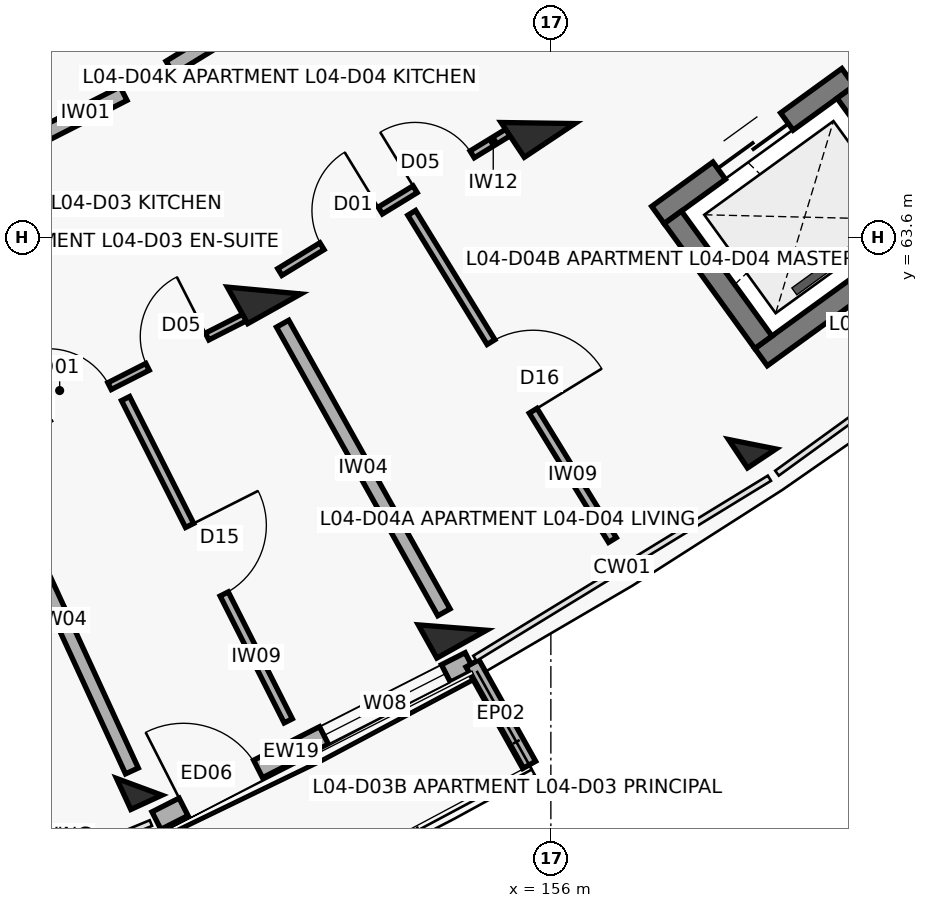
"""IFC4 building model, lengths in metres.
Left out: names, types, materials, properties, quantities, classifications, styles, units other than length and angle.
Written with IfcOpenShell. Run it as: python <this file> out.ifc"""

import sys

from ifc_helpers import new_model, si_unit, direction, frame, frame_2d, origin, origin_2d, place, context, subcontext, project, spatial, rectangle, extrude, element, fill, save


model = new_model("IFC4")
c1 = context("Model", 3, precision=1e-05, world=origin(), true_north=direction((0.0, 1.0)))
c2 = subcontext(c1, "Body", "Model", "MODEL_VIEW")
j1 = project(units=[si_unit("LENGTHUNIT", "METRE"), si_unit("PLANEANGLEUNIT", "RADIAN")], contexts=[c1])
p1 = place(None, origin())
s1 = spatial("IfcSite", under=j1, at=p1, CompositionType="ELEMENT")
p2 = place(p1, origin())
s2 = spatial("IfcBuilding", under=s1, at=p2, CompositionType="ELEMENT")
p3 = place(p2, frame((0.0, 0.0, 14.3)))
s3 = spatial("IfcBuildingStorey", under=s2, at=p3, CompositionType="ELEMENT", Elevation=14.3)
p4 = place(p3, frame((150.584, 56.367, 0.0), z_axis=(0.0, 0.0, 1.0), x_axis=(0.417867073801, -0.908508177527, 0.0)))
e1 = element("IfcColumn", 1, at=p4, inside=s3, PredefinedType="COLUMN", context=c2, shape_type="SweptSolid", body=[
    extrude(rectangle(XDim=0.45, YDim=0.45, at=origin_2d()), origin(), (0.0, 0.0, 1.0), 3.1),
])
p5 = place(p3, frame((152.227, 62.897, 0.0), z_axis=(0.0, 0.0, 1.0), x_axis=(0.487859659139, -0.87292207727, 0.0)))
e2 = element("IfcColumn", 2, at=p5, inside=s3, PredefinedType="COLUMN", context=c2, shape_type="SweptSolid", body=[
    extrude(rectangle(XDim=0.55, YDim=0.8, at=origin_2d()), origin(), (0.0, 0.0, 1.0), 3.1),
])
p6 = place(p3, frame((154.705, 58.462, 0.0), z_axis=(0.0, 0.0, 1.0), x_axis=(0.487859659139, -0.87292207727, 0.0)))
e3 = element("IfcColumn", 3, at=p6, inside=s3, PredefinedType="COLUMN", context=c2, shape_type="SweptSolid", body=[
    extrude(rectangle(XDim=0.5, YDim=0.75, at=origin_2d()), origin(), (0.0, 0.0, 1.0), 3.1),
])
p7 = place(p3, frame((155.831, 65.101, 0.0), z_axis=(0.0, 0.0, 1.0), x_axis=(0.554844427448, -0.83195412213, 0.0)))
e4 = element("IfcColumn", 4, at=p7, inside=s3, PredefinedType="COLUMN", context=c2, shape_type="SweptSolid", body=[
    extrude(rectangle(XDim=0.55, YDim=0.8, at=origin_2d()), origin(), (0.0, 0.0, 1.0), 3.1),
])
p8 = place(p3, frame((158.649, 60.875, 0.0), z_axis=(0.0, 0.0, 1.0), x_axis=(0.554844427448, -0.83195412213, 0.0)))
e5 = element("IfcColumn", 5, at=p8, inside=s3, PredefinedType="COLUMN", context=c2, shape_type="SweptSolid", body=[
    extrude(rectangle(XDim=0.45, YDim=0.45, at=origin_2d()), origin(), (0.0, 0.0, 1.0), 3.1),
])
p9 = place(p3, frame((150.811, 55.922, 0.0), z_axis=(0.0, 0.0, 1.0), x_axis=(0.891407190547, 0.453203288428, 0.0)))
e6 = element("IfcWall", 6, at=p9, inside=s3, PredefinedType="SOLIDWALL", context=c2, shape_type="SweptSolid", body=[
    extrude(rectangle(XDim=4.623, YDim=0.258, at=frame_2d((2.311, 0.0))), origin(), (0.0, 0.0, 1.0), 2.25),
])
p10 = place(p9, frame((0.4, 0.0, 0.0)))
e7 = element("IfcOpeningElement", 7, at=p10, cuts=e6, PredefinedType="OPENING", context=c2, shape_type="SweptSolid", body=[
    extrude(rectangle(XDim=1.1, YDim=2.15, at=frame_2d((0.55, 1.075))), frame((0.0, 0.139, 0.0), z_axis=(0.0, -1.0, 0.0), x_axis=(1.0, 0.0, 0.0)), (0.0, 0.0, 1.0), 0.278),
])
p11 = place(p9, frame((2.472, 0.0, 0.35)))
e8 = element("IfcOpeningElement", 8, at=p11, cuts=e6, PredefinedType="OPENING", context=c2, shape_type="SweptSolid", body=[
    extrude(rectangle(XDim=1.8, YDim=1.65, at=frame_2d((0.9, 0.825))), frame((0.0, 0.139, 0.0), z_axis=(0.0, -1.0, 0.0), x_axis=(1.0, 0.0, 0.0)), (0.0, 0.0, 1.0), 0.278),
])
p12 = place(p3, frame((154.969, 57.991, 0.0), z_axis=(0.0, 0.0, 1.0), x_axis=(0.487971560724, -0.872859528175, 0.0)))
e9 = element("IfcWall", 9, at=p12, inside=s3, PredefinedType="PARAPET", context=c2, shape_type="SweptSolid", body=[
    extrude(rectangle(XDim=1.53, YDim=0.195, at=frame_2d((0.765, 0.0))), origin(), (0.0, 0.0, 1.0), 2.25),
])
p13 = place(p3, frame((157.583, 70.041, 0.0), z_axis=(0.0, 0.0, 1.0), x_axis=(0.648762810187, -0.760990680704, 0.0)))
e10 = element("IfcWall", 10, at=p13, inside=s3, PredefinedType="SHEAR", context=c2, shape_type="SweptSolid", body=[
    extrude(rectangle(XDim=7.69, YDim=0.3, at=frame_2d((3.845, 0.0))), origin(), (0.0, 0.0, 1.0), 3.1),
])
p14 = place(p3, frame((157.409, 63.89, 0.0), z_axis=(0.0, 0.0, 1.0), x_axis=(0.809510936031, 0.587104798521, 0.0)))
e11 = element("IfcWall", 11, at=p14, inside=s3, PredefinedType="SHEAR", context=c2, shape_type="SweptSolid", body=[
    extrude(rectangle(XDim=3.09, YDim=0.28, at=frame_2d((1.545, 0.0))), origin(), (0.0, 0.0, 1.0), 3.1),
])
p15 = place(p14, frame((0.995, 0.0, 0.0)))
e12 = element("IfcOpeningElement", 12, at=p15, cuts=e11, PredefinedType="OPENING", context=c2, shape_type="SweptSolid", body=[
    extrude(rectangle(XDim=1.1, YDim=2.15, at=frame_2d((0.55, 1.075))), frame((0.0, 0.15, 0.0), z_axis=(0.0, -1.0, 0.0), x_axis=(1.0, 0.0, 0.0)), (0.0, 0.0, 1.0), 0.3),
])
p16 = place(p3, frame((158.765, 62.021, 0.0), z_axis=(0.0, 0.0, 1.0), x_axis=(0.809548485838, 0.587053020669, 0.0)))
e13 = element("IfcWall", 13, at=p16, inside=s3, PredefinedType="SHEAR", context=c2, shape_type="SweptSolid", body=[
    extrude(rectangle(XDim=3.09, YDim=0.28, at=frame_2d((1.545, 0.0))), origin(), (0.0, 0.0, 1.0), 3.1),
])
p17 = place(p3, frame((157.604, 63.859, 0.0), z_axis=(0.0, 0.0, 1.0), x_axis=(0.587127188998, -0.809494696671, 0.0)))
e14 = element("IfcWall", 14, at=p17, inside=s3, PredefinedType="SHEAR", context=c2, shape_type="SweptSolid", body=[
    extrude(rectangle(XDim=2.03, YDim=0.28, at=frame_2d((1.015, 0.0))), origin(), (0.0, 0.0, 1.0), 3.1),
])
p18 = place(p3, frame((159.879, 65.509, 0.0), z_axis=(0.0, 0.0, 1.0), x_axis=(0.58704837408, -0.809551855344, 0.0)))
e15 = element("IfcWall", 15, at=p18, inside=s3, PredefinedType="SHEAR", context=c2, shape_type="SweptSolid", body=[
    extrude(rectangle(XDim=2.03, YDim=0.28, at=frame_2d((1.015, 0.0))), origin(), (0.0, 0.0, 1.0), 3.1),
])
p19 = place(p3, frame((147.457, 64.003, 0.0), z_axis=(0.0, 0.0, 1.0), x_axis=(0.891412167565, 0.45319349898, 0.0)))
e16 = element("IfcWall", 16, at=p19, inside=s3, PredefinedType="SOLIDWALL", context=c2, shape_type="SweptSolid", body=[
    extrude(rectangle(XDim=3.277, YDim=0.2, at=frame_2d((1.639, 0.0))), origin(), (0.0, 0.0, 1.0), 2.08),
])
p20 = place(p19, frame((1.128, 0.0, 0.0)))
e17 = element("IfcOpeningElement", 17, at=p20, cuts=e16, PredefinedType="OPENING", context=c2, shape_type="SweptSolid", body=[
    extrude(rectangle(XDim=1.02, YDim=2.15, at=frame_2d((0.51, 1.075))), frame((0.0, 0.11, 0.0), z_axis=(0.0, -1.0, 0.0), x_axis=(1.0, 0.0, 0.0)), (0.0, 0.0, 1.0), 0.22),
])
p21 = place(p3, frame((148.812, 60.937, 0.0), z_axis=(0.0, 0.0, 1.0), x_axis=(0.89140212369, 0.453213254309, 0.0)))
e18 = element("IfcWall", 18, at=p21, inside=s3, PredefinedType="PARTITIONING", context=c2, shape_type="SweptSolid", body=[
    extrude(rectangle(XDim=3.64, YDim=0.1, at=frame_2d((1.82, 0.0))), origin(), (0.0, 0.0, 1.0), 2.08),
])
p22 = place(p21, frame((0.65, 0.0, 0.0)))
e19 = element("IfcOpeningElement", 19, at=p22, cuts=e18, PredefinedType="OPENING", context=c2, shape_type="SweptSolid", body=[
    extrude(rectangle(XDim=0.9, YDim=2.1, at=frame_2d((0.45, 1.05))), frame((0.0, 0.06, 0.0), z_axis=(0.0, -1.0, 0.0), x_axis=(1.0, 0.0, 0.0)), (0.0, 0.0, 1.0), 0.12),
])
p23 = place(p21, frame((2.11, 0.0, 0.0)))
e20 = element("IfcOpeningElement", 20, at=p23, cuts=e18, PredefinedType="OPENING", context=c2, shape_type="SweptSolid", body=[
    extrude(rectangle(XDim=0.88, YDim=2.1, at=frame_2d((0.44, 1.05))), frame((0.0, 0.06, 0.0), z_axis=(0.0, -1.0, 0.0), x_axis=(1.0, 0.0, 0.0)), (0.0, 0.0, 1.0), 0.12),
])
p24 = place(p3, frame((150.404, 61.475, 0.0), z_axis=(0.0, 0.0, 1.0), x_axis=(0.450664257057, -0.892693523787, 0.0)))
e21 = element("IfcWall", 21, at=p24, inside=s3, PredefinedType="PARTITIONING", context=c2, shape_type="SweptSolid", body=[
    extrude(rectangle(XDim=4.75, YDim=0.12, at=frame_2d((2.375, 0.0))), origin(), (0.0, 0.0, 1.0), 2.08),
])
p25 = place(p24, frame((1.87, 0.0, 0.0)))
e22 = element("IfcOpeningElement", 22, at=p25, cuts=e21, PredefinedType="OPENING", context=c2, shape_type="SweptSolid", body=[
    extrude(rectangle(XDim=1.01, YDim=2.1, at=frame_2d((0.505, 1.05))), frame((0.0, 0.07, 0.0), z_axis=(0.0, -1.0, 0.0), x_axis=(1.0, 0.0, 0.0)), (0.0, 0.0, 1.0), 0.14),
])
p26 = place(p3, frame((148.67, 60.528, 0.0), z_axis=(0.0, 0.0, 1.0), x_axis=(0.417837051164, -0.908521985796, 0.0)))
e23 = element("IfcWall", 23, at=p26, inside=s3, PredefinedType="SOLIDWALL", context=c2, shape_type="SweptSolid", body=[
    extrude(rectangle(XDim=4.35, YDim=0.185, at=frame_2d((2.175, 0.0))), origin(), (0.0, 0.0, 1.0), 2.08),
])
p27 = place(p3, frame((150.989, 65.829, 0.0), z_axis=(0.0, 0.0, 1.0), x_axis=(0.853090237845, 0.521763400492, 0.0)))
e24 = element("IfcWall", 24, at=p27, inside=s3, PredefinedType="SOLIDWALL", context=c2, shape_type="SweptSolid", body=[
    extrude(rectangle(XDim=3.277, YDim=0.2, at=frame_2d((1.638, 0.0))), origin(), (0.0, 0.0, 1.0), 2.08),
])
p28 = place(p27, frame((1.148, 0.0, 0.0)))
e25 = element("IfcOpeningElement", 25, at=p28, cuts=e24, PredefinedType="OPENING", context=c2, shape_type="SweptSolid", body=[
    extrude(rectangle(XDim=0.98, YDim=2.15, at=frame_2d((0.49, 1.075))), frame((0.0, 0.11, 0.0), z_axis=(0.0, -1.0, 0.0), x_axis=(1.0, 0.0, 0.0)), (0.0, 0.0, 1.0), 0.22),
])
p29 = place(p3, frame((152.434, 63.141, 0.0), z_axis=(0.0, 0.0, 1.0), x_axis=(0.853089873067, 0.521763996909, 0.0)))
e26 = element("IfcWall", 26, at=p29, inside=s3, PredefinedType="PARTITIONING", context=c2, shape_type="SweptSolid", body=[
    extrude(rectangle(XDim=3.616, YDim=0.105, at=frame_2d((1.808, 0.0))), origin(), (0.0, 0.0, 1.0), 2.08),
])
p30 = place(p29, frame((0.65, 0.0, 0.0)))
e27 = element("IfcOpeningElement", 27, at=p30, cuts=e26, PredefinedType="OPENING", context=c2, shape_type="SweptSolid", body=[
    extrude(rectangle(XDim=0.9, YDim=2.1, at=frame_2d((0.45, 1.05))), frame((0.0, 0.062, 0.0), z_axis=(0.0, -1.0, 0.0), x_axis=(1.0, 0.0, 0.0)), (0.0, 0.0, 1.0), 0.125),
])
p31 = place(p29, frame((2.086, 0.0, 0.0)))
e28 = element("IfcOpeningElement", 28, at=p31, cuts=e26, PredefinedType="OPENING", context=c2, shape_type="SweptSolid", body=[
    extrude(rectangle(XDim=0.88, YDim=2.1, at=frame_2d((0.44, 1.05))), frame((0.0, 0.062, 0.0), z_axis=(0.0, -1.0, 0.0), x_axis=(1.0, 0.0, 0.0)), (0.0, 0.0, 1.0), 0.125),
])
p32 = place(p3, frame((154.169, 63.919, 0.0), z_axis=(0.0, 0.0, 1.0), x_axis=(0.522980301869, -0.852344768188, 0.0)))
e29 = element("IfcWall", 29, at=p32, inside=s3, PredefinedType="PARTITIONING", context=c2, shape_type="SweptSolid", body=[
    extrude(rectangle(XDim=5.05, YDim=0.12, at=frame_2d((2.525, 0.0))), origin(), (0.0, 0.0, 1.0), 2.08),
])
p33 = place(p32, frame((1.995, 0.0, 0.0)))
e30 = element("IfcOpeningElement", 30, at=p33, cuts=e29, PredefinedType="OPENING", context=c2, shape_type="SweptSolid", body=[
    extrude(rectangle(XDim=1.06, YDim=2.1, at=frame_2d((0.53, 1.05))), frame((0.0, 0.07, 0.0), z_axis=(0.0, -1.0, 0.0), x_axis=(1.0, 0.0, 0.0)), (0.0, 0.0, 1.0), 0.14),
])
p34 = place(p3, frame((152.471, 62.46, 0.0), z_axis=(0.0, 0.0, 1.0), x_axis=(0.487866639184, -0.872918176218, 0.0)))
e31 = element("IfcWall", 31, at=p34, inside=s3, PredefinedType="SOLIDWALL", context=c2, shape_type="SweptSolid", body=[
    extrude(rectangle(XDim=4.35, YDim=0.185, at=frame_2d((2.175, 0.0))), origin(), (0.0, 0.0, 1.0), 2.08),
])
p35 = place(p10, origin())
e32 = element("IfcDoor", 32, at=p35, inside=s3, OperationType="SINGLE_SWING_LEFT", PredefinedType="DOOR", context=c2, shape_type="SweptSolid", body=[
    extrude(rectangle(XDim=1.1, YDim=2.15, at=frame_2d((0.55, 1.075))), frame((0.0, 0.025, 0.0), z_axis=(0.0, -1.0, 0.0), x_axis=(1.0, 0.0, 0.0)), (0.0, 0.0, 1.0), 0.05),
])
fill(e7, e32)
p36 = place(p11, origin())
e33 = element("IfcWindow", 33, at=p36, inside=s3, PartitioningType="TRIPLE_PANEL_VERTICAL", PredefinedType="WINDOW", context=c2, shape_type="SweptSolid", body=[
    extrude(rectangle(XDim=1.8, YDim=1.65, at=frame_2d((0.9, 0.825))), frame((0.0, 0.03, 0.0), z_axis=(0.0, -1.0, 0.0), x_axis=(1.0, 0.0, 0.0)), (0.0, 0.0, 1.0), 0.06),
])
fill(e8, e33)
p37 = place(p15, origin())
e34 = element("IfcDoor", 34, at=p37, inside=s3, OperationType="DOUBLE_DOOR_SLIDING", PredefinedType="DOOR", context=c2, shape_type="SweptSolid", body=[
    extrude(rectangle(XDim=1.1, YDim=2.15, at=frame_2d((0.55, 1.075))), frame((0.0, 0.025, 0.0), z_axis=(0.0, -1.0, 0.0), x_axis=(1.0, 0.0, 0.0)), (0.0, 0.0, 1.0), 0.05),
])
fill(e12, e34)
p38 = place(p22, origin())
e35 = element("IfcDoor", 35, at=p38, inside=s3, OperationType="SINGLE_SWING_LEFT", PredefinedType="DOOR", context=c2, shape_type="SweptSolid", body=[
    extrude(rectangle(XDim=0.9, YDim=2.1, at=frame_2d((0.45, 1.05))), frame((0.0, 0.025, 0.0), z_axis=(0.0, -1.0, 0.0), x_axis=(1.0, 0.0, 0.0)), (0.0, 0.0, 1.0), 0.05),
])
fill(e19, e35)
p39 = place(p23, origin())
e36 = element("IfcDoor", 36, at=p39, inside=s3, OperationType="SINGLE_SWING_RIGHT", PredefinedType="DOOR", context=c2, shape_type="SweptSolid", body=[
    extrude(rectangle(XDim=0.88, YDim=2.1, at=frame_2d((0.44, 1.05))), frame((0.0, 0.025, 0.0), z_axis=(0.0, -1.0, 0.0), x_axis=(1.0, 0.0, 0.0)), (0.0, 0.0, 1.0), 0.05),
])
fill(e20, e36)
p40 = place(p25, origin())
e37 = element("IfcDoor", 37, at=p40, inside=s3, OperationType="SINGLE_SWING_LEFT", PredefinedType="DOOR", context=c2, shape_type="SweptSolid", body=[
    extrude(rectangle(XDim=1.01, YDim=2.1, at=frame_2d((0.505, 1.05))), frame((0.0, 0.025, 0.0), z_axis=(0.0, -1.0, 0.0), x_axis=(1.0, 0.0, 0.0)), (0.0, 0.0, 1.0), 0.05),
])
fill(e22, e37)
p41 = place(p30, origin())
e38 = element("IfcDoor", 38, at=p41, inside=s3, OperationType="SINGLE_SWING_RIGHT", PredefinedType="DOOR", context=c2, shape_type="SweptSolid", body=[
    extrude(rectangle(XDim=0.9, YDim=2.1, at=frame_2d((0.45, 1.05))), frame((0.0, 0.025, 0.0), z_axis=(0.0, -1.0, 0.0), x_axis=(1.0, 0.0, 0.0)), (0.0, 0.0, 1.0), 0.05),
])
fill(e27, e38)
p42 = place(p31, origin())
e39 = element("IfcDoor", 39, at=p42, inside=s3, OperationType="SINGLE_SWING_LEFT", PredefinedType="DOOR", context=c2, shape_type="SweptSolid", body=[
    extrude(rectangle(XDim=0.88, YDim=2.1, at=frame_2d((0.44, 1.05))), frame((0.0, 0.025, 0.0), z_axis=(0.0, -1.0, 0.0), x_axis=(1.0, 0.0, 0.0)), (0.0, 0.0, 1.0), 0.05),
])
fill(e28, e39)
p43 = place(p33, origin())
e40 = element("IfcDoor", 40, at=p43, inside=s3, OperationType="SINGLE_SWING_RIGHT", PredefinedType="DOOR", context=c2, shape_type="SweptSolid", body=[
    extrude(rectangle(XDim=1.06, YDim=2.1, at=frame_2d((0.53, 1.05))), frame((0.0, 0.025, 0.0), z_axis=(0.0, -1.0, 0.0), x_axis=(1.0, 0.0, 0.0)), (0.0, 0.0, 1.0), 0.05),
])
fill(e30, e40)
save(model, sys.argv[1])
